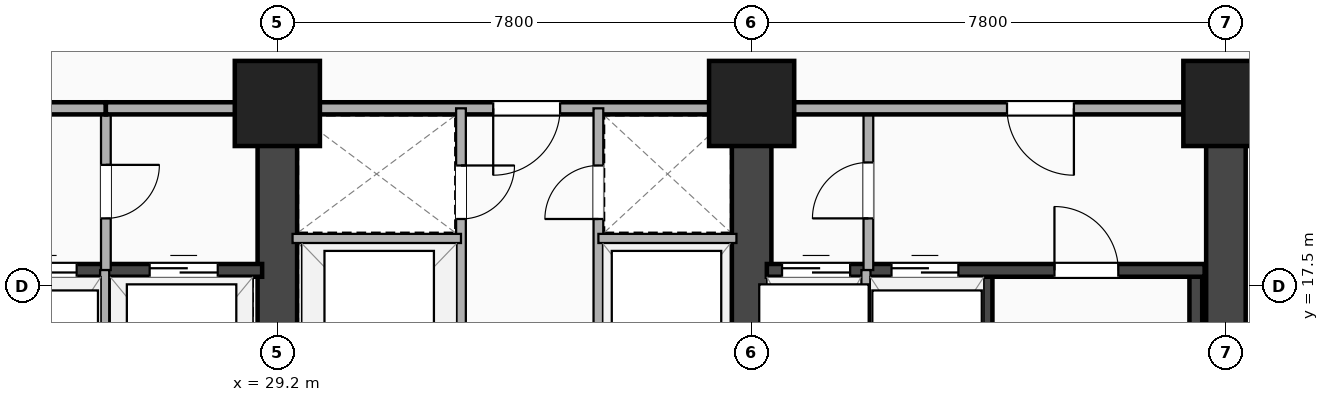
"""IFC4 building model, lengths in metres.
Left out: names, types, materials, properties, quantities, classifications, styles, units other than length and angle.
Written with IfcOpenShell. Run it as: python <this file> out.ifc"""

import sys

from ifc_helpers import new_model, si_unit, direction, frame, frame_2d, origin, origin_2d, place, context, subcontext, project, spatial, rectangle, extrude, element, fill, save


model = new_model("IFC4")
c1 = context("Model", 3, precision=1e-05, world=origin(), true_north=direction((0.0, 1.0)))
c2 = subcontext(c1, "Body", "Model", "MODEL_VIEW")
j1 = project(units=[si_unit("LENGTHUNIT", "METRE"), si_unit("PLANEANGLEUNIT", "RADIAN")], contexts=[c1])
p1 = place(None, origin())
s1 = spatial("IfcSite", under=j1, at=p1, CompositionType="ELEMENT")
p2 = place(p1, origin())
s2 = spatial("IfcBuilding", under=s1, at=p2, CompositionType="ELEMENT")
p3 = place(p2, frame((0.0, 0.0, 50.9)))
s3 = spatial("IfcBuildingStorey", under=s2, at=p3, CompositionType="ELEMENT", Elevation=50.9)
p4 = place(p3, frame((44.8, 3.5, 0.0), z_axis=(0.0, 0.0, 1.0), x_axis=(0.0, 1.0, 0.0)))
e1 = element("IfcWall", 1, at=p4, inside=s3, PredefinedType="SHEAR", context=c2, shape_type="SweptSolid", body=[
    extrude(rectangle(XDim=16.9, YDim=0.65, at=frame_2d((8.45, 0.0))), origin(), (0.0, 0.0, 1.0), 3.22),
])
p5 = place(p3, frame((29.2, 3.5, 0.0), z_axis=(0.0, 0.0, 1.0), x_axis=(0.0, 1.0, 0.0)))
e2 = element("IfcWall", 2, at=p5, inside=s3, PredefinedType="SHEAR", context=c2, shape_type="SweptSolid", body=[
    extrude(rectangle(XDim=16.9, YDim=0.65, at=frame_2d((8.45, 0.0))), origin(), (0.0, 0.0, 1.0), 3.22),
])
p6 = place(p5, frame((7.75, 0.0, 0.0), z_axis=(0.0, 0.0, 1.0), x_axis=(-1.0, 0.0, 0.0)))
e3 = element("IfcOpeningElement", 3, at=p6, cuts=e2, PredefinedType="OPENING", context=c2, shape_type="SweptSolid", body=[
    extrude(rectangle(XDim=1.1, YDim=2.15, at=frame_2d((0.55, 1.075))), frame((0.0, 0.335, 0.0), z_axis=(0.0, -1.0, 0.0), x_axis=(1.0, 0.0, 0.0)), (0.0, 0.0, 1.0), 0.67),
])
p7 = place(p3, frame((37.0, 3.5, 0.0), z_axis=(0.0, 0.0, 1.0), x_axis=(0.0, 1.0, 0.0)))
e4 = element("IfcWall", 4, at=p7, inside=s3, PredefinedType="SHEAR", context=c2, shape_type="SweptSolid", body=[
    extrude(rectangle(XDim=16.9, YDim=0.65, at=frame_2d((8.45, 0.0))), origin(), (0.0, 0.0, 1.0), 3.22),
])
p8 = place(p7, frame((6.65, 0.0, 0.0)))
e5 = element("IfcOpeningElement", 5, at=p8, cuts=e4, PredefinedType="OPENING", context=c2, shape_type="SweptSolid", body=[
    extrude(rectangle(XDim=1.1, YDim=2.15, at=frame_2d((0.55, 1.075))), frame((0.0, 0.335, 0.0), z_axis=(0.0, -1.0, 0.0), x_axis=(1.0, 0.0, 0.0)), (0.0, 0.0, 1.0), 0.67),
])
p9 = place(p3, frame((20.65, 17.755, 0.0), z_axis=(0.0, 0.0, 1.0), x_axis=(1.0, 0.0, 0.0)))
e6 = element("IfcWall", 6, at=p9, inside=s3, PredefinedType="SHEAR", context=c2, shape_type="SweptSolid", body=[
    extrude(rectangle(XDim=8.3, YDim=0.21, at=frame_2d((4.15, 0.0))), origin(), (0.0, 0.0, 1.0), 3.22),
])
p10 = place(p9, frame((2.2, 0.0, 0.0), z_axis=(0.0, 0.0, 1.0), x_axis=(-1.0, 0.0, 0.0)))
e7 = element("IfcOpeningElement", 7, at=p10, cuts=e6, PredefinedType="OPENING", context=c2, shape_type="SweptSolid", body=[
    extrude(rectangle(XDim=1.05, YDim=2.15, at=frame_2d((0.525, 1.075))), frame((0.0, 0.115, 0.0), z_axis=(0.0, -1.0, 0.0), x_axis=(1.0, 0.0, 0.0)), (0.0, 0.0, 1.0), 0.23),
])
p11 = place(p9, frame((4.15, 0.0, 0.0)))
e8 = element("IfcOpeningElement", 8, at=p11, cuts=e6, PredefinedType="OPENING", context=c2, shape_type="SweptSolid", body=[
    extrude(rectangle(XDim=1.1, YDim=2.18, at=frame_2d((0.55, 1.09))), frame((0.0, 0.115, 0.0), z_axis=(0.0, -1.0, 0.0), x_axis=(1.0, 0.0, 0.0)), (0.0, 0.0, 1.0), 0.23),
])
p12 = place(p9, frame((6.45, 0.0, 0.0)))
e9 = element("IfcOpeningElement", 9, at=p12, cuts=e6, PredefinedType="OPENING", context=c2, shape_type="SweptSolid", body=[
    extrude(rectangle(XDim=1.12, YDim=2.2, at=frame_2d((0.56, 1.1))), frame((0.0, 0.115, 0.0), z_axis=(0.0, -1.0, 0.0), x_axis=(1.0, 0.0, 0.0)), (0.0, 0.0, 1.0), 0.23),
])
for number, where, z_axis, x_axis in (
    (10, (40.855, 9.745, 0.0), (0.0, 0.0, 1.0), (0.0, 1.0, 0.0)),
    (11, (44.305, 9.745, 0.0), (0.0, 0.0, 1.0), (0.0, 1.0, 0.0)),
):
    element("IfcWall", number, at=place(p3, frame(where, z_axis=z_axis, x_axis=x_axis)), inside=s3, PredefinedType="SHEAR", context=c2, shape_type="SweptSolid", body=[
        extrude(rectangle(XDim=8.01, YDim=0.21, at=frame_2d((4.005, 0.0))), origin(), (0.0, 0.0, 1.0), 3.22),
    ])
p13 = place(p3, frame((37.25, 17.755, 0.0), z_axis=(0.0, 0.0, 1.0), x_axis=(1.0, 0.0, 0.0)))
e12 = element("IfcWall", 12, at=p13, inside=s3, PredefinedType="SHEAR", context=c2, shape_type="SweptSolid", body=[
    extrude(rectangle(XDim=7.2, YDim=0.21, at=frame_2d((3.6, 0.0))), origin(), (0.0, 0.0, 1.0), 3.22),
])
p14 = place(p13, frame((0.25, 0.0, 0.0)))
e13 = element("IfcOpeningElement", 13, at=p14, cuts=e12, PredefinedType="OPENING", context=c2, shape_type="SweptSolid", body=[
    extrude(rectangle(XDim=1.12, YDim=2.2, at=frame_2d((0.56, 1.1))), frame((0.0, 0.115, 0.0), z_axis=(0.0, -1.0, 0.0), x_axis=(1.0, 0.0, 0.0)), (0.0, 0.0, 1.0), 0.23),
])
p15 = place(p13, frame((2.05, 0.0, 0.0)))
e14 = element("IfcOpeningElement", 14, at=p15, cuts=e12, PredefinedType="OPENING", context=c2, shape_type="SweptSolid", body=[
    extrude(rectangle(XDim=1.1, YDim=2.18, at=frame_2d((0.55, 1.09))), frame((0.0, 0.115, 0.0), z_axis=(0.0, -1.0, 0.0), x_axis=(1.0, 0.0, 0.0)), (0.0, 0.0, 1.0), 0.23),
])
p16 = place(p13, frame((5.78, 0.0, 0.0), z_axis=(0.0, 0.0, 1.0), x_axis=(-1.0, 0.0, 0.0)))
e15 = element("IfcOpeningElement", 15, at=p16, cuts=e12, PredefinedType="OPENING", context=c2, shape_type="SweptSolid", body=[
    extrude(rectangle(XDim=1.05, YDim=2.15, at=frame_2d((0.525, 1.075))), frame((0.0, 0.115, 0.0), z_axis=(0.0, -1.0, 0.0), x_axis=(1.0, 0.0, 0.0)), (0.0, 0.0, 1.0), 0.23),
])
for number, where, z_axis, x_axis in (
    (16, (29.2, 20.5, -0.28), (0.0, 0.0, 1.0), (1.0, 0.0, 0.0)),
    (17, (37.0, 20.5, -0.28), (0.0, 0.0, 1.0), (1.0, 0.0, 0.0)),
    (18, (44.8, 20.5, -0.28), (0.0, 0.0, 1.0), (1.0, 0.0, 0.0)),
):
    element("IfcColumn", number, at=place(p3, frame(where, z_axis=z_axis, x_axis=x_axis)), inside=s3, PredefinedType="COLUMN", context=c2, shape_type="SweptSolid", body=[
        extrude(rectangle(XDim=1.4, YDim=1.4, at=origin_2d()), origin(), (0.0, 0.0, 1.0), 3.5),
    ])
p17 = place(p3, frame((26.38, 17.76, 0.0), z_axis=(0.0, 0.0, 1.0), x_axis=(0.0, 1.0, 0.0)))
e19 = element("IfcWall", 19, at=p17, inside=s3, PredefinedType="PARTITIONING", context=c2, shape_type="SweptSolid", body=[
    extrude(rectangle(XDim=2.66, YDim=0.16, at=frame_2d((1.33, 0.0))), origin(), (0.0, 0.0, 1.0), 2.51),
])
p18 = place(p17, frame((0.85, 0.0, 0.0)))
e20 = element("IfcOpeningElement", 20, at=p18, cuts=e19, PredefinedType="OPENING", context=c2, shape_type="SweptSolid", body=[
    extrude(rectangle(XDim=0.88, YDim=2.08, at=frame_2d((0.44, 1.04))), frame((0.0, 0.09, 0.0), z_axis=(0.0, -1.0, 0.0), x_axis=(1.0, 0.0, 0.0)), (0.0, 0.0, 1.0), 0.18),
])
p19 = place(p3, frame((38.92, 17.76, 0.0), z_axis=(0.0, 0.0, 1.0), x_axis=(0.0, 1.0, 0.0)))
e21 = element("IfcWall", 21, at=p19, inside=s3, PredefinedType="PARTITIONING", context=c2, shape_type="SweptSolid", body=[
    extrude(rectangle(XDim=2.66, YDim=0.16, at=frame_2d((1.33, 0.0))), origin(), (0.0, 0.0, 1.0), 2.51),
])
p20 = place(p19, frame((1.77, 0.0, 0.0), z_axis=(0.0, 0.0, 1.0), x_axis=(-1.0, 0.0, 0.0)))
e22 = element("IfcOpeningElement", 22, at=p20, cuts=e21, PredefinedType="OPENING", context=c2, shape_type="SweptSolid", body=[
    extrude(rectangle(XDim=0.92, YDim=2.08, at=frame_2d((0.46, 1.04))), frame((0.0, 0.09, 0.0), z_axis=(0.0, -1.0, 0.0), x_axis=(1.0, 0.0, 0.0)), (0.0, 0.0, 1.0), 0.18),
])
for number, where, z_axis, x_axis in (
    (23, (26.36, 14.72, 0.0), (0.0, 0.0, 1.0), (0.0, 1.0, 0.0)),
    (24, (38.88, 14.72, 0.0), (0.0, 0.0, 1.0), (0.0, 1.0, 0.0)),
):
    element("IfcWall", number, at=place(p3, frame(where, z_axis=z_axis, x_axis=x_axis)), inside=s3, PredefinedType="PARTITIONING", context=c2, shape_type="SweptSolid", body=[
        extrude(rectangle(XDim=3.04, YDim=0.15, at=frame_2d((1.52, 0.0))), origin(), (0.0, 0.0, 1.0), 3.22),
    ])
p21 = place(p3, frame((20.65, 20.42, 0.0), z_axis=(0.0, 0.0, 1.0), x_axis=(1.0, 0.0, 0.0)))
e25 = element("IfcWall", 25, at=p21, inside=s3, PredefinedType="PARTITIONING", context=c2, shape_type="SweptSolid", body=[
    extrude(rectangle(XDim=5.73, YDim=0.2, at=frame_2d((2.865, 0.0))), origin(), (0.0, 0.0, 1.0), 2.51),
])
p22 = place(p21, frame((2.3, 0.0, 0.0)))
e26 = element("IfcOpeningElement", 26, at=p22, cuts=e25, PredefinedType="OPENING", context=c2, shape_type="SweptSolid", body=[
    extrude(rectangle(XDim=1.1, YDim=2.15, at=frame_2d((0.55, 1.075))), frame((0.0, 0.11, 0.0), z_axis=(0.0, -1.0, 0.0), x_axis=(1.0, 0.0, 0.0)), (0.0, 0.0, 1.0), 0.22),
])
p23 = place(p3, frame((26.38, 20.42, 0.0), z_axis=(0.0, 0.0, 1.0), x_axis=(1.0, 0.0, 0.0)))
e27 = element("IfcWall", 27, at=p23, inside=s3, PredefinedType="PARTITIONING", context=c2, shape_type="SweptSolid", body=[
    extrude(rectangle(XDim=2.82, YDim=0.2, at=frame_2d((1.41, 0.0))), origin(), (0.0, 0.0, 1.0), 2.51),
])
p24 = place(p3, frame((29.2, 20.42, 0.0), z_axis=(0.0, 0.0, 1.0), x_axis=(1.0, 0.0, 0.0)))
e28 = element("IfcWall", 28, at=p24, inside=s3, PredefinedType="PARTITIONING", context=c2, shape_type="SweptSolid", body=[
    extrude(rectangle(XDim=7.8, YDim=0.2, at=frame_2d((3.9, 0.0))), origin(), (0.0, 0.0, 1.0), 2.51),
])
p25 = place(p24, frame((3.55, 0.0, 0.0)))
e29 = element("IfcOpeningElement", 29, at=p25, cuts=e28, PredefinedType="OPENING", context=c2, shape_type="SweptSolid", body=[
    extrude(rectangle(XDim=1.1, YDim=2.15, at=frame_2d((0.55, 1.075))), frame((0.0, 0.11, 0.0), z_axis=(0.0, -1.0, 0.0), x_axis=(1.0, 0.0, 0.0)), (0.0, 0.0, 1.0), 0.22),
])
p26 = place(p3, frame((37.0, 20.42, 0.0), z_axis=(0.0, 0.0, 1.0), x_axis=(1.0, 0.0, 0.0)))
e30 = element("IfcWall", 30, at=p26, inside=s3, PredefinedType="PARTITIONING", context=c2, shape_type="SweptSolid", body=[
    extrude(rectangle(XDim=7.45, YDim=0.2, at=frame_2d((3.725, 0.0))), origin(), (0.0, 0.0, 1.0), 2.51),
])
p27 = place(p26, frame((4.2, 0.0, 0.0)))
e31 = element("IfcOpeningElement", 31, at=p27, cuts=e30, PredefinedType="OPENING", context=c2, shape_type="SweptSolid", body=[
    extrude(rectangle(XDim=1.1, YDim=2.15, at=frame_2d((0.55, 1.075))), frame((0.0, 0.11, 0.0), z_axis=(0.0, -1.0, 0.0), x_axis=(1.0, 0.0, 0.0)), (0.0, 0.0, 1.0), 0.22),
])
p28 = place(p3, frame((32.22, 12.5, 0.0), z_axis=(0.0, 0.0, 1.0), x_axis=(0.0, 1.0, 0.0)))
e32 = element("IfcWall", 32, at=p28, inside=s3, PredefinedType="PARTITIONING", context=c2, shape_type="SweptSolid", body=[
    extrude(rectangle(XDim=7.92, YDim=0.16, at=frame_2d((3.96, 0.0))), origin(), (0.0, 0.0, 1.0), 2.51),
])
p29 = place(p28, frame((6.1, 0.0, 0.0)))
e33 = element("IfcOpeningElement", 33, at=p29, cuts=e32, PredefinedType="OPENING", context=c2, shape_type="SweptSolid", body=[
    extrude(rectangle(XDim=0.88, YDim=2.08, at=frame_2d((0.44, 1.04))), frame((0.0, 0.09, 0.0), z_axis=(0.0, -1.0, 0.0), x_axis=(1.0, 0.0, 0.0)), (0.0, 0.0, 1.0), 0.18),
])
p30 = place(p3, frame((34.48, 12.5, 0.0), z_axis=(0.0, 0.0, 1.0), x_axis=(0.0, 1.0, 0.0)))
e34 = element("IfcWall", 34, at=p30, inside=s3, PredefinedType="PARTITIONING", context=c2, shape_type="SweptSolid", body=[
    extrude(rectangle(XDim=7.92, YDim=0.16, at=frame_2d((3.96, 0.0))), origin(), (0.0, 0.0, 1.0), 2.51),
])
p31 = place(p30, frame((6.98, 0.0, 0.0), z_axis=(0.0, 0.0, 1.0), x_axis=(-1.0, 0.0, 0.0)))
e35 = element("IfcOpeningElement", 35, at=p31, cuts=e34, PredefinedType="OPENING", context=c2, shape_type="SweptSolid", body=[
    extrude(rectangle(XDim=0.88, YDim=2.08, at=frame_2d((0.44, 1.04))), frame((0.0, 0.09, 0.0), z_axis=(0.0, -1.0, 0.0), x_axis=(1.0, 0.0, 0.0)), (0.0, 0.0, 1.0), 0.18),
])
p32 = place(p3, frame((29.45, 18.28, 0.0), z_axis=(0.0, 0.0, 1.0), x_axis=(1.0, 0.0, 0.0)))
e36 = element("IfcWall", 36, at=p32, inside=s3, PredefinedType="PARTITIONING", context=c2, shape_type="SweptSolid", body=[
    extrude(rectangle(XDim=2.77, YDim=0.15, at=frame_2d((1.385, 0.0))), origin(), (0.0, 0.0, 1.0), 3.22),
])
p33 = place(p3, frame((34.48, 18.28, 0.0), z_axis=(0.0, 0.0, 1.0), x_axis=(1.0, 0.0, 0.0)))
e37 = element("IfcWall", 37, at=p33, inside=s3, PredefinedType="PARTITIONING", context=c2, shape_type="SweptSolid", body=[
    extrude(rectangle(XDim=2.27, YDim=0.15, at=frame_2d((1.135, 0.0))), origin(), (0.0, 0.0, 1.0), 3.22),
])
p34 = place(p3, frame((44.8, 20.42, 0.0), z_axis=(0.0, 0.0, 1.0), x_axis=(1.0, 0.0, 0.0)))
e38 = element("IfcWall", 38, at=p34, inside=s3, PredefinedType="PARTITIONING", context=c2, shape_type="SweptSolid", body=[
    extrude(rectangle(XDim=1.65, YDim=0.16, at=frame_2d((0.825, 0.0))), origin(), (0.0, 0.0, 1.0), 2.51),
])
p35 = place(p11, origin())
e39 = element("IfcDoor", 39, at=p35, inside=s3, OperationType="DOUBLE_DOOR_SLIDING", PredefinedType="DOOR", context=c2, shape_type="SweptSolid", body=[
    extrude(rectangle(XDim=1.1, YDim=2.18, at=frame_2d((0.55, 1.09))), frame((0.0, 0.025, 0.0), z_axis=(0.0, -1.0, 0.0), x_axis=(1.0, 0.0, 0.0)), (0.0, 0.0, 1.0), 0.05),
])
fill(e8, e39)
p36 = place(p12, origin())
e40 = element("IfcDoor", 40, at=p36, inside=s3, OperationType="DOUBLE_DOOR_SLIDING", PredefinedType="DOOR", context=c2, shape_type="SweptSolid", body=[
    extrude(rectangle(XDim=1.12, YDim=2.2, at=frame_2d((0.56, 1.1))), frame((0.0, 0.025, 0.0), z_axis=(0.0, -1.0, 0.0), x_axis=(1.0, 0.0, 0.0)), (0.0, 0.0, 1.0), 0.05),
])
fill(e9, e40)
p37 = place(p14, origin())
e41 = element("IfcDoor", 41, at=p37, inside=s3, OperationType="DOUBLE_DOOR_SLIDING", PredefinedType="DOOR", context=c2, shape_type="SweptSolid", body=[
    extrude(rectangle(XDim=1.12, YDim=2.2, at=frame_2d((0.56, 1.1))), frame((0.0, 0.025, 0.0), z_axis=(0.0, -1.0, 0.0), x_axis=(1.0, 0.0, 0.0)), (0.0, 0.0, 1.0), 0.05),
])
fill(e13, e41)
p38 = place(p15, origin())
e42 = element("IfcDoor", 42, at=p38, inside=s3, OperationType="DOUBLE_DOOR_SLIDING", PredefinedType="DOOR", context=c2, shape_type="SweptSolid", body=[
    extrude(rectangle(XDim=1.1, YDim=2.18, at=frame_2d((0.55, 1.09))), frame((0.0, 0.025, 0.0), z_axis=(0.0, -1.0, 0.0), x_axis=(1.0, 0.0, 0.0)), (0.0, 0.0, 1.0), 0.05),
])
fill(e14, e42)
p39 = place(p16, origin())
e43 = element("IfcDoor", 43, at=p39, inside=s3, OperationType="SINGLE_SWING_LEFT", PredefinedType="DOOR", context=c2, shape_type="SweptSolid", body=[
    extrude(rectangle(XDim=1.05, YDim=2.15, at=frame_2d((0.525, 1.075))), frame((0.0, 0.025, 0.0), z_axis=(0.0, -1.0, 0.0), x_axis=(1.0, 0.0, 0.0)), (0.0, 0.0, 1.0), 0.05),
])
fill(e15, e43)
p40 = place(p18, origin())
e44 = element("IfcDoor", 44, at=p40, inside=s3, OperationType="SINGLE_SWING_RIGHT", PredefinedType="DOOR", context=c2, shape_type="SweptSolid", body=[
    extrude(rectangle(XDim=0.88, YDim=2.08, at=frame_2d((0.44, 1.04))), frame((0.0, 0.025, 0.0), z_axis=(0.0, -1.0, 0.0), x_axis=(1.0, 0.0, 0.0)), (0.0, 0.0, 1.0), 0.05),
])
fill(e20, e44)
p41 = place(p20, origin())
e45 = element("IfcDoor", 45, at=p41, inside=s3, OperationType="SINGLE_SWING_LEFT", PredefinedType="DOOR", context=c2, shape_type="SweptSolid", body=[
    extrude(rectangle(XDim=0.92, YDim=2.08, at=frame_2d((0.46, 1.04))), frame((0.0, 0.025, 0.0), z_axis=(0.0, -1.0, 0.0), x_axis=(1.0, 0.0, 0.0)), (0.0, 0.0, 1.0), 0.05),
])
fill(e22, e45)
p42 = place(p25, origin())
e46 = element("IfcDoor", 46, at=p42, inside=s3, OperationType="SINGLE_SWING_LEFT", PredefinedType="DOOR", context=c2, shape_type="SweptSolid", body=[
    extrude(rectangle(XDim=1.1, YDim=2.15, at=frame_2d((0.55, 1.075))), frame((0.0, 0.025, 0.0), z_axis=(0.0, -1.0, 0.0), x_axis=(1.0, 0.0, 0.0)), (0.0, 0.0, 1.0), 0.05),
])
fill(e29, e46)
p43 = place(p27, origin())
e47 = element("IfcDoor", 47, at=p43, inside=s3, OperationType="SINGLE_SWING_RIGHT", PredefinedType="DOOR", context=c2, shape_type="SweptSolid", body=[
    extrude(rectangle(XDim=1.1, YDim=2.15, at=frame_2d((0.55, 1.075))), frame((0.0, 0.025, 0.0), z_axis=(0.0, -1.0, 0.0), x_axis=(1.0, 0.0, 0.0)), (0.0, 0.0, 1.0), 0.05),
])
fill(e31, e47)
p44 = place(p29, origin())
e48 = element("IfcDoor", 48, at=p44, inside=s3, OperationType="SINGLE_SWING_RIGHT", PredefinedType="DOOR", context=c2, shape_type="SweptSolid", body=[
    extrude(rectangle(XDim=0.88, YDim=2.08, at=frame_2d((0.44, 1.04))), frame((0.0, 0.025, 0.0), z_axis=(0.0, -1.0, 0.0), x_axis=(1.0, 0.0, 0.0)), (0.0, 0.0, 1.0), 0.05),
])
fill(e33, e48)
p45 = place(p31, origin())
e49 = element("IfcDoor", 49, at=p45, inside=s3, OperationType="SINGLE_SWING_LEFT", PredefinedType="DOOR", context=c2, shape_type="SweptSolid", body=[
    extrude(rectangle(XDim=0.88, YDim=2.08, at=frame_2d((0.44, 1.04))), frame((0.0, 0.025, 0.0), z_axis=(0.0, -1.0, 0.0), x_axis=(1.0, 0.0, 0.0)), (0.0, 0.0, 1.0), 0.05),
])
fill(e35, e49)
save(model, sys.argv[1])
